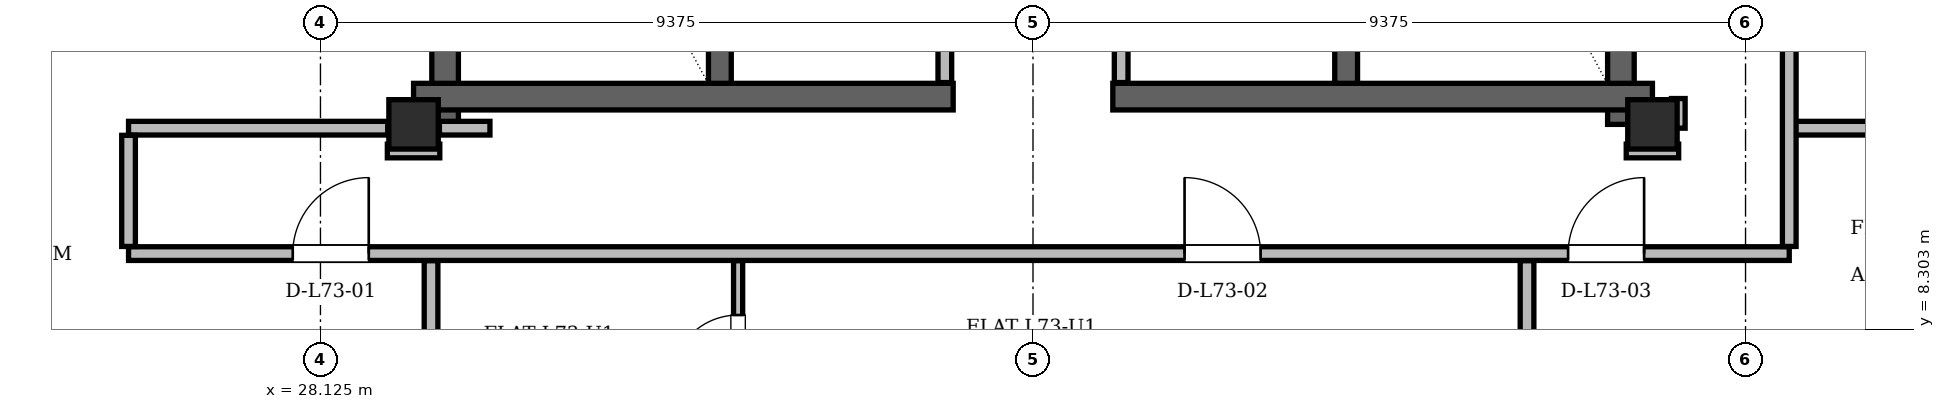
"""IFC4 building model, lengths in metres.
Left out: names, types, materials, properties, quantities, classifications, styles, units other than length and angle.
Written with IfcOpenShell. Run it as: python <this file> out.ifc"""

import sys

from ifc_helpers import new_model, si_unit, direction, frame, frame_2d, origin, origin_2d, place, context, subcontext, project, spatial, rectangle, hollow_rectangle, extrude, element, fill, save


model = new_model("IFC4")
c1 = context("Model", 3, precision=1e-05, world=origin(), true_north=direction((0.0, 1.0)))
c2 = subcontext(c1, "Body", "Model", "MODEL_VIEW")
j1 = project(units=[si_unit("LENGTHUNIT", "METRE"), si_unit("PLANEANGLEUNIT", "RADIAN")], contexts=[c1])
p1 = place(None, origin())
s1 = spatial("IfcSite", under=j1, at=p1, CompositionType="ELEMENT")
p2 = place(p1, origin())
s2 = spatial("IfcBuilding", under=s1, at=p2, CompositionType="ELEMENT")
p3 = place(p2, frame((0.0, 0.0, 277.2)))
s3 = spatial("IfcBuildingStorey", under=s2, at=p3, CompositionType="ELEMENT", Elevation=277.2)
for number, where, z_axis, x_axis in (
    (1, (29.35, 11.0, 0.0), (0.0, 0.0, 1.0), (1.0, 0.0, 0.0)),
    (2, (45.65, 11.0, 0.0), (0.0, 0.0, 1.0), (1.0, 0.0, 0.0)),
):
    element("IfcColumn", number, at=place(p3, frame(where, z_axis=z_axis, x_axis=x_axis)), inside=s3, PredefinedType="COLUMN", context=c2, shape_type="SweptSolid", body=[
        extrude(hollow_rectangle(XDim=0.65, YDim=0.65, WallThickness=0.05, at=origin_2d()), origin(), (0.0, 0.0, 1.0), 3.9),
    ])
for number, where, z_axis, x_axis in (
    (3, (29.765, 11.0, 0.0), (0.0, 0.0, 1.0), (0.0, 1.0, 0.0)),
    (4, (45.235, 11.0, 0.0), (0.0, 0.0, 1.0), (0.0, 1.0, 0.0)),
):
    element("IfcWall", number, at=place(p3, frame(where, z_axis=z_axis, x_axis=x_axis)), inside=s3, PredefinedType="SHEAR", context=c2, shape_type="SweptSolid", body=[
        extrude(rectangle(XDim=13.3, YDim=0.35, at=frame_2d((6.65, 0.0))), origin(), (0.0, 0.0, 1.0), 3.68),
    ])
for number, where, z_axis, x_axis in (
    (5, (29.35, 11.365, 0.0), (0.0, 0.0, 1.0), (1.0, 0.0, 0.0)),
    (6, (38.55, 11.365, 0.0), (0.0, 0.0, 1.0), (1.0, 0.0, 0.0)),
):
    element("IfcWall", number, at=place(p3, frame(where, z_axis=z_axis, x_axis=x_axis)), inside=s3, PredefinedType="SHEAR", context=c2, shape_type="SweptSolid", body=[
        extrude(rectangle(XDim=7.1, YDim=0.35, at=frame_2d((3.55, 0.0))), origin(), (0.0, 0.0, 1.0), 3.68),
    ])
for number, where, z_axis, x_axis in (
    (7, (33.38, 11.54, 0.0), (0.0, 0.0, 1.0), (0.0, 1.0, 0.0)),
    (8, (41.62, 11.54, 0.0), (0.0, 0.0, 1.0), (0.0, 1.0, 0.0)),
):
    element("IfcWall", number, at=place(p3, frame(where, z_axis=z_axis, x_axis=x_axis)), inside=s3, PredefinedType="SHEAR", context=c2, shape_type="SweptSolid", body=[
        extrude(rectangle(XDim=7.62, YDim=0.3, at=frame_2d((3.81, 0.0))), origin(), (0.0, 0.0, 1.0), 3.68),
    ])
p4 = place(p3, frame((58.493, 10.633, 0.0), z_axis=(0.0, 0.0, 1.0), x_axis=(-0.499998095684, 0.866026503239, 0.0)))
e9 = element("IfcWall", 9, at=p4, inside=s3, PredefinedType="SOLIDWALL", context=c2, shape_type="SweptSolid", body=[
    extrude(rectangle(XDim=37.389, YDim=0.29, at=frame_2d((18.695, 0.0))), origin(), (0.0, 0.0, 1.0), 3.058),
])
p5 = place(p4, frame((8.034, 0.0, 0.0)))
e10 = element("IfcOpeningElement", 10, at=p5, cuts=e9, PredefinedType="OPENING", context=c2, shape_type="SweptSolid", body=[
    extrude(rectangle(XDim=1.5, YDim=2.2, at=frame_2d((0.75, 1.1))), frame((0.0, 0.145, 0.0), z_axis=(0.0, -1.0, 0.0), x_axis=(1.0, 0.0, 0.0)), (0.0, 0.0, 1.0), 0.29),
])
p6 = place(p4, frame((29.1, 0.0, 0.0)))
e11 = element("IfcOpeningElement", 11, at=p6, cuts=e9, PredefinedType="OPENING", context=c2, shape_type="SweptSolid", body=[
    extrude(rectangle(XDim=1.5, YDim=2.2, at=frame_2d((0.75, 1.1))), frame((0.0, 0.145, 0.0), z_axis=(0.0, -1.0, 0.0), x_axis=(1.0, 0.0, 0.0)), (0.0, 0.0, 1.0), 0.29),
])
p7 = place(p4, frame((3.531, 0.0, 0.85)))
e12 = element("IfcOpeningElement", 12, at=p7, cuts=e9, PredefinedType="OPENING", context=c2, shape_type="SweptSolid", body=[
    extrude(rectangle(XDim=1.2, YDim=1.48, at=frame_2d((0.6, 0.74))), frame((0.0, 0.145, 0.0), z_axis=(0.0, -1.0, 0.0), x_axis=(1.0, 0.0, 0.0)), (0.0, 0.0, 1.0), 0.29),
])
p8 = place(p4, frame((1.055, 0.0, 0.85)))
e13 = element("IfcOpeningElement", 13, at=p8, cuts=e9, PredefinedType="OPENING", context=c2, shape_type="SweptSolid", body=[
    extrude(rectangle(XDim=1.2, YDim=1.48, at=frame_2d((0.6, 0.74))), frame((0.0, 0.145, 0.0), z_axis=(0.0, -1.0, 0.0), x_axis=(1.0, 0.0, 0.0)), (0.0, 0.0, 1.0), 0.29),
])
p9 = place(p4, frame((35.336, 0.0, 0.85)))
e14 = element("IfcOpeningElement", 14, at=p9, cuts=e9, PredefinedType="OPENING", context=c2, shape_type="SweptSolid", body=[
    extrude(rectangle(XDim=1.2, YDim=1.48, at=frame_2d((0.6, 0.74))), frame((0.0, 0.145, 0.0), z_axis=(0.0, -1.0, 0.0), x_axis=(1.0, 0.0, 0.0)), (0.0, 0.0, 1.0), 0.29),
])
p10 = place(p4, frame((16.956, 0.0, 0.85)))
e15 = element("IfcOpeningElement", 15, at=p10, cuts=e9, PredefinedType="OPENING", context=c2, shape_type="SweptSolid", body=[
    extrude(rectangle(XDim=1.2, YDim=1.48, at=frame_2d((0.6, 0.74))), frame((0.0, 0.145, 0.0), z_axis=(0.0, -1.0, 0.0), x_axis=(1.0, 0.0, 0.0)), (0.0, 0.0, 1.0), 0.29),
])
p11 = place(p4, frame((19.392, 0.0, 0.85)))
e16 = element("IfcOpeningElement", 16, at=p11, cuts=e9, PredefinedType="OPENING", context=c2, shape_type="SweptSolid", body=[
    extrude(rectangle(XDim=1.8, YDim=1.75, at=frame_2d((0.9, 0.875))), frame((0.0, 0.145, 0.0), z_axis=(0.0, -1.0, 0.0), x_axis=(1.0, 0.0, 0.0)), (0.0, 0.0, 1.0), 0.29),
])
p12 = place(p4, frame((22.638, 0.0, 0.85)))
e17 = element("IfcOpeningElement", 17, at=p12, cuts=e9, PredefinedType="OPENING", context=c2, shape_type="SweptSolid", body=[
    extrude(rectangle(XDim=2.2, YDim=1.85, at=frame_2d((1.1, 0.925))), frame((0.0, 0.145, 0.0), z_axis=(0.0, -1.0, 0.0), x_axis=(1.0, 0.0, 0.0)), (0.0, 0.0, 1.0), 0.29),
])
p13 = place(p4, frame((14.58, 0.0, 0.85)))
e18 = element("IfcOpeningElement", 18, at=p13, cuts=e9, PredefinedType="OPENING", context=c2, shape_type="SweptSolid", body=[
    extrude(rectangle(XDim=1.2, YDim=1.48, at=frame_2d((0.6, 0.74))), frame((0.0, 0.145, 0.0), z_axis=(0.0, -1.0, 0.0), x_axis=(1.0, 0.0, 0.0)), (0.0, 0.0, 1.0), 0.29),
])
p14 = place(p3, frame((35.202, 43.013, 0.0), z_axis=(0.0, 0.0, 1.0), x_axis=(-0.499998095684, -0.866026503239, 0.0)))
e19 = element("IfcWall", 19, at=p14, inside=s3, PredefinedType="SOLIDWALL", context=c2, shape_type="SweptSolid", body=[
    extrude(rectangle(XDim=37.389, YDim=0.29, at=frame_2d((18.695, 0.0))), origin(), (0.0, 0.0, 1.0), 3.058),
])
p15 = place(p14, frame((8.034, 0.0, 0.0)))
e20 = element("IfcOpeningElement", 20, at=p15, cuts=e19, PredefinedType="OPENING", context=c2, shape_type="SweptSolid", body=[
    extrude(rectangle(XDim=1.5, YDim=2.2, at=frame_2d((0.75, 1.1))), frame((0.0, 0.145, 0.0), z_axis=(0.0, -1.0, 0.0), x_axis=(1.0, 0.0, 0.0)), (0.0, 0.0, 1.0), 0.29),
])
p16 = place(p14, frame((32.25, 0.0, 0.0)))
e21 = element("IfcOpeningElement", 21, at=p16, cuts=e19, PredefinedType="OPENING", context=c2, shape_type="SweptSolid", body=[
    extrude(rectangle(XDim=1.5, YDim=2.2, at=frame_2d((0.75, 1.1))), frame((0.0, 0.145, 0.0), z_axis=(0.0, -1.0, 0.0), x_axis=(1.0, 0.0, 0.0)), (0.0, 0.0, 1.0), 0.29),
])
p17 = place(p14, frame((35.223, 0.0, 0.85)))
e22 = element("IfcOpeningElement", 22, at=p17, cuts=e19, PredefinedType="OPENING", context=c2, shape_type="SweptSolid", body=[
    extrude(rectangle(XDim=1.2, YDim=1.48, at=frame_2d((0.6, 0.74))), frame((0.0, 0.145, 0.0), z_axis=(0.0, -1.0, 0.0), x_axis=(1.0, 0.0, 0.0)), (0.0, 0.0, 1.0), 0.29),
])
p18 = place(p14, frame((29.461, 0.0, 0.85)))
e23 = element("IfcOpeningElement", 23, at=p18, cuts=e19, PredefinedType="OPENING", context=c2, shape_type="SweptSolid", body=[
    extrude(rectangle(XDim=1.2, YDim=1.48, at=frame_2d((0.6, 0.74))), frame((0.0, 0.145, 0.0), z_axis=(0.0, -1.0, 0.0), x_axis=(1.0, 0.0, 0.0)), (0.0, 0.0, 1.0), 0.29),
])
p19 = place(p14, frame((20.271, 0.0, 0.85)))
e24 = element("IfcOpeningElement", 24, at=p19, cuts=e19, PredefinedType="OPENING", context=c2, shape_type="SweptSolid", body=[
    extrude(rectangle(XDim=1.2, YDim=1.48, at=frame_2d((0.6, 0.74))), frame((0.0, 0.145, 0.0), z_axis=(0.0, -1.0, 0.0), x_axis=(1.0, 0.0, 0.0)), (0.0, 0.0, 1.0), 0.29),
])
p20 = place(p14, frame((22.555, 0.0, 0.85)))
e25 = element("IfcOpeningElement", 25, at=p20, cuts=e19, PredefinedType="OPENING", context=c2, shape_type="SweptSolid", body=[
    extrude(rectangle(XDim=1.2, YDim=1.48, at=frame_2d((0.6, 0.74))), frame((0.0, 0.145, 0.0), z_axis=(0.0, -1.0, 0.0), x_axis=(1.0, 0.0, 0.0)), (0.0, 0.0, 1.0), 0.29),
])
p21 = place(p14, frame((27.315, 0.0, 0.85)))
e26 = element("IfcOpeningElement", 26, at=p21, cuts=e19, PredefinedType="OPENING", context=c2, shape_type="SweptSolid", body=[
    extrude(rectangle(XDim=1.2, YDim=1.48, at=frame_2d((0.6, 0.74))), frame((0.0, 0.145, 0.0), z_axis=(0.0, -1.0, 0.0), x_axis=(1.0, 0.0, 0.0)), (0.0, 0.0, 1.0), 0.29),
])
p22 = place(p14, frame((3.242, 0.0, 0.85)))
e27 = element("IfcOpeningElement", 27, at=p22, cuts=e19, PredefinedType="OPENING", context=c2, shape_type="SweptSolid", body=[
    extrude(rectangle(XDim=1.2, YDim=1.48, at=frame_2d((0.6, 0.74))), frame((0.0, 0.145, 0.0), z_axis=(0.0, -1.0, 0.0), x_axis=(1.0, 0.0, 0.0)), (0.0, 0.0, 1.0), 0.29),
])
p23 = place(p3, frame((36.34, 11.55, 0.0), z_axis=(0.0, 0.0, 1.0), x_axis=(0.0, 1.0, 0.0)))
e28 = element("IfcWall", 28, at=p23, inside=s3, PredefinedType="PARTITIONING", context=c2, shape_type="SweptSolid", body=[
    extrude(rectangle(XDim=5.55, YDim=0.18, at=frame_2d((2.775, 0.0))), origin(), (0.0, 0.0, 1.0), 3.68),
])
p24 = place(p23, frame((2.85, 0.0, 0.0)))
e29 = element("IfcOpeningElement", 29, at=p24, cuts=e28, PredefinedType="OPENING", context=c2, shape_type="SweptSolid", body=[
    extrude(rectangle(XDim=0.95, YDim=2.1, at=frame_2d((0.475, 1.05))), frame((0.0, 0.09, 0.0), z_axis=(0.0, -1.0, 0.0), x_axis=(1.0, 0.0, 0.0)), (0.0, 0.0, 1.0), 0.18),
])
p25 = place(p3, frame((38.66, 11.55, 0.0), z_axis=(0.0, 0.0, 1.0), x_axis=(0.0, 1.0, 0.0)))
e30 = element("IfcWall", 30, at=p25, inside=s3, PredefinedType="PARTITIONING", context=c2, shape_type="SweptSolid", body=[
    extrude(rectangle(XDim=5.55, YDim=0.18, at=frame_2d((2.775, 0.0))), origin(), (0.0, 0.0, 1.0), 3.68),
])
p26 = place(p25, frame((3.15, 0.0, 0.0)))
e31 = element("IfcOpeningElement", 31, at=p26, cuts=e30, PredefinedType="OPENING", context=c2, shape_type="SweptSolid", body=[
    extrude(rectangle(XDim=0.95, YDim=2.1, at=frame_2d((0.475, 1.05))), frame((0.0, 0.09, 0.0), z_axis=(0.0, -1.0, 0.0), x_axis=(1.0, 0.0, 0.0)), (0.0, 0.0, 1.0), 0.18),
])
p27 = place(p3, frame((25.6, 9.3, 0.0), z_axis=(0.0, 0.0, 1.0), x_axis=(1.0, 0.0, 0.0)))
e32 = element("IfcWall", 32, at=p27, inside=s3, PredefinedType="PARTITIONING", context=c2, shape_type="SweptSolid", body=[
    extrude(rectangle(XDim=21.85, YDim=0.18, at=frame_2d((10.925, 0.0))), origin(), (0.0, 0.0, 1.0), 3.68),
])
p28 = place(p27, frame((2.16, 0.0, 0.0)))
e33 = element("IfcOpeningElement", 33, at=p28, cuts=e32, PredefinedType="OPENING", context=c2, shape_type="SweptSolid", body=[
    extrude(rectangle(XDim=1.0, YDim=2.18, at=frame_2d((0.5, 1.09))), frame((0.0, 0.09, 0.0), z_axis=(0.0, -1.0, 0.0), x_axis=(1.0, 0.0, 0.0)), (0.0, 0.0, 1.0), 0.18),
])
p29 = place(p27, frame((13.894, 0.0, 0.0)))
e34 = element("IfcOpeningElement", 34, at=p29, cuts=e32, PredefinedType="OPENING", context=c2, shape_type="SweptSolid", body=[
    extrude(rectangle(XDim=1.0, YDim=2.18, at=frame_2d((0.5, 1.09))), frame((0.0, 0.09, 0.0), z_axis=(0.0, -1.0, 0.0), x_axis=(1.0, 0.0, 0.0)), (0.0, 0.0, 1.0), 0.18),
])
p30 = place(p27, frame((18.94, 0.0, 0.0)))
e35 = element("IfcOpeningElement", 35, at=p30, cuts=e32, PredefinedType="OPENING", context=c2, shape_type="SweptSolid", body=[
    extrude(rectangle(XDim=1.0, YDim=2.18, at=frame_2d((0.5, 1.09))), frame((0.0, 0.09, 0.0), z_axis=(0.0, -1.0, 0.0), x_axis=(1.0, 0.0, 0.0)), (0.0, 0.0, 1.0), 0.18),
])
for number, where, z_axis, x_axis in (
    (36, (29.005, 10.65, 0.0), (0.0, 0.0, 1.0), (1.0, 0.0, 0.0)),
    (37, (45.305, 10.65, 0.0), (0.0, 0.0, 1.0), (1.0, 0.0, 0.0)),
):
    element("IfcWall", number, at=place(p3, frame(where, z_axis=z_axis, x_axis=x_axis)), inside=s3, PredefinedType="PARTITIONING", context=c2, shape_type="SweptSolid", body=[
        extrude(rectangle(XDim=0.69, YDim=0.18, at=frame_2d((0.345, 0.0))), origin(), (0.0, 0.0, 1.0), 3.68),
    ])
p31 = place(p3, frame((25.6, 10.95, 0.0), z_axis=(0.0, 0.0, 1.0), x_axis=(1.0, 0.0, 0.0)))
e38 = element("IfcWall", 38, at=p31, inside=s3, PredefinedType="PARTITIONING", context=c2, shape_type="SweptSolid", body=[
    extrude(rectangle(XDim=3.41, YDim=0.18, at=frame_2d((1.705, 0.0))), origin(), (0.0, 0.0, 1.0), 3.266),
])
p32 = place(p3, frame((29.69, 10.95, 0.0), z_axis=(0.0, 0.0, 1.0), x_axis=(1.0, 0.0, 0.0)))
e39 = element("IfcWall", 39, at=p32, inside=s3, PredefinedType="PARTITIONING", context=c2, shape_type="SweptSolid", body=[
    extrude(rectangle(XDim=0.665, YDim=0.18, at=frame_2d((0.333, 0.0))), origin(), (0.0, 0.0, 1.0), 2.82),
])
p33 = place(p3, frame((47.45, 10.95, 0.0), z_axis=(0.0, 0.0, 1.0), x_axis=(1.0, 0.0, 0.0)))
e40 = element("IfcWall", 40, at=p33, inside=s3, PredefinedType="PARTITIONING", context=c2, shape_type="SweptSolid", body=[
    extrude(rectangle(XDim=10.688, YDim=0.18, at=frame_2d((5.344, 0.0))), origin(), (0.0, 0.0, 1.0), 3.266),
])
p34 = place(p3, frame((25.6, 9.394, 0.0), z_axis=(0.0, 0.0, 1.0), x_axis=(0.0, 1.0, 0.0)))
e41 = element("IfcWall", 41, at=p34, inside=s3, PredefinedType="PARTITIONING", context=c2, shape_type="SweptSolid", body=[
    extrude(rectangle(XDim=1.462, YDim=0.18, at=frame_2d((0.731, 0.0))), origin(), (0.0, 0.0, 1.0), 3.266),
])
p35 = place(p3, frame((29.58, 6.802, 0.0), z_axis=(0.0, 0.0, 1.0), x_axis=(0.0, 1.0, 0.0)))
e42 = element("IfcWall", 42, at=p35, inside=s3, PredefinedType="PARTITIONING", context=c2, shape_type="SweptSolid", body=[
    extrude(rectangle(XDim=2.404, YDim=0.18, at=frame_2d((1.202, 0.0))), origin(), (0.0, 0.0, 1.0), 3.68),
])
p36 = place(p3, frame((33.62, 6.802, 0.0), z_axis=(0.0, 0.0, 1.0), x_axis=(0.0, 1.0, 0.0)))
e43 = element("IfcWall", 43, at=p36, inside=s3, PredefinedType="PARTITIONING", context=c2, shape_type="SweptSolid", body=[
    extrude(rectangle(XDim=2.404, YDim=0.12, at=frame_2d((1.202, 0.0))), origin(), (0.0, 0.0, 1.0), 3.68),
])
p37 = place(p36, frame((0.81, 0.0, 0.0)))
e44 = element("IfcOpeningElement", 44, at=p37, cuts=e43, PredefinedType="OPENING", context=c2, shape_type="SweptSolid", body=[
    extrude(rectangle(XDim=0.88, YDim=2.08, at=frame_2d((0.44, 1.04))), frame((0.0, 0.06, 0.0), z_axis=(0.0, -1.0, 0.0), x_axis=(1.0, 0.0, 0.0)), (0.0, 0.0, 1.0), 0.12),
])
p38 = place(p3, frame((44.0, 6.802, 0.0), z_axis=(0.0, 0.0, 1.0), x_axis=(0.0, 1.0, 0.0)))
e45 = element("IfcWall", 45, at=p38, inside=s3, PredefinedType="PARTITIONING", context=c2, shape_type="SweptSolid", body=[
    extrude(rectangle(XDim=2.404, YDim=0.18, at=frame_2d((1.202, 0.0))), origin(), (0.0, 0.0, 1.0), 3.68),
])
p39 = place(p3, frame((45.99, 10.95, 0.0), z_axis=(0.0, 0.0, 1.0), x_axis=(0.0, 1.0, 0.0)))
e46 = element("IfcWall", 46, at=p39, inside=s3, PredefinedType="PARTITIONING", context=c2, shape_type="SweptSolid", body=[
    extrude(rectangle(XDim=0.39, YDim=0.18, at=frame_2d((0.195, 0.0))), origin(), (0.0, 0.0, 1.0), 3.68),
])
p40 = place(p3, frame((47.45, 9.394, 0.0), z_axis=(0.0, 0.0, 1.0), x_axis=(0.0, 1.0, 0.0)))
e47 = element("IfcWall", 47, at=p40, inside=s3, PredefinedType="PARTITIONING", context=c2, shape_type="SweptSolid", body=[
    extrude(rectangle(XDim=16.482, YDim=0.18, at=frame_2d((8.241, 0.0))), origin(), (0.0, 0.0, 1.0), 3.266),
])
p41 = place(p40, frame((6.188, 0.0, 0.0)))
e48 = element("IfcOpeningElement", 48, at=p41, cuts=e47, PredefinedType="OPENING", context=c2, shape_type="SweptSolid", body=[
    extrude(rectangle(XDim=1.0, YDim=2.18, at=frame_2d((0.5, 1.09))), frame((0.0, 0.09, 0.0), z_axis=(0.0, -1.0, 0.0), x_axis=(1.0, 0.0, 0.0)), (0.0, 0.0, 1.0), 0.18),
])
p42 = place(p40, frame((12.749, 0.0, 0.0)))
e49 = element("IfcOpeningElement", 49, at=p42, cuts=e47, PredefinedType="OPENING", context=c2, shape_type="SweptSolid", body=[
    extrude(rectangle(XDim=1.0, YDim=2.18, at=frame_2d((0.5, 1.09))), frame((0.0, 0.09, 0.0), z_axis=(0.0, -1.0, 0.0), x_axis=(1.0, 0.0, 0.0)), (0.0, 0.0, 1.0), 0.18),
])
p43 = place(p28, origin())
e50 = element("IfcDoor", 50, at=p43, inside=s3, OperationType="SINGLE_SWING_RIGHT", PredefinedType="DOOR", context=c2, shape_type="SweptSolid", body=[
    extrude(rectangle(XDim=1.0, YDim=2.18, at=frame_2d((0.5, 1.09))), frame((0.0, 0.025, 0.0), z_axis=(0.0, -1.0, 0.0), x_axis=(1.0, 0.0, 0.0)), (0.0, 0.0, 1.0), 0.05),
])
fill(e33, e50)
p44 = place(p29, origin())
e51 = element("IfcDoor", 51, at=p44, inside=s3, OperationType="SINGLE_SWING_LEFT", PredefinedType="DOOR", context=c2, shape_type="SweptSolid", body=[
    extrude(rectangle(XDim=1.0, YDim=2.18, at=frame_2d((0.5, 1.09))), frame((0.0, 0.025, 0.0), z_axis=(0.0, -1.0, 0.0), x_axis=(1.0, 0.0, 0.0)), (0.0, 0.0, 1.0), 0.05),
])
fill(e34, e51)
p45 = place(p30, origin())
e52 = element("IfcDoor", 52, at=p45, inside=s3, OperationType="SINGLE_SWING_RIGHT", PredefinedType="DOOR", context=c2, shape_type="SweptSolid", body=[
    extrude(rectangle(XDim=1.0, YDim=2.18, at=frame_2d((0.5, 1.09))), frame((0.0, 0.025, 0.0), z_axis=(0.0, -1.0, 0.0), x_axis=(1.0, 0.0, 0.0)), (0.0, 0.0, 1.0), 0.05),
])
fill(e35, e52)
p46 = place(p37, origin())
e53 = element("IfcDoor", 53, at=p46, inside=s3, OperationType="SINGLE_SWING_LEFT", PredefinedType="DOOR", context=c2, shape_type="SweptSolid", body=[
    extrude(rectangle(XDim=0.88, YDim=2.08, at=frame_2d((0.44, 1.04))), frame((0.0, 0.025, 0.0), z_axis=(0.0, -1.0, 0.0), x_axis=(1.0, 0.0, 0.0)), (0.0, 0.0, 1.0), 0.05),
])
fill(e44, e53)
save(model, sys.argv[1])
